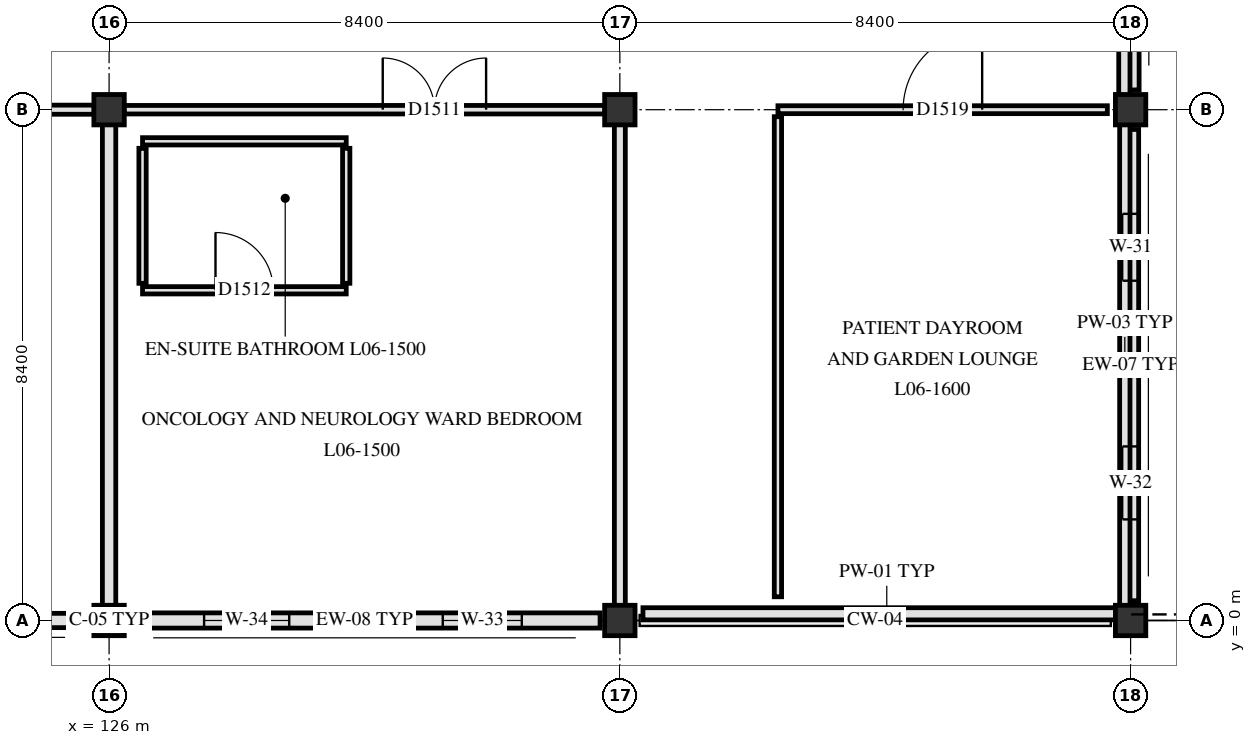
"""IFC4 building model, lengths in metres.
Left out: names, types, materials, properties, quantities, classifications, styles, units other than length and angle.
Written with IfcOpenShell. Run it as: python <this file> out.ifc"""

import sys

from ifc_helpers import new_model, si_unit, direction, frame, frame_2d, origin, origin_2d, place, context, subcontext, project, spatial, rectangle, extrude, element, fill, save


model = new_model("IFC4")
c1 = context("Model", 3, precision=1e-05, world=origin(), true_north=direction((0.0, 1.0)))
c2 = subcontext(c1, "Body", "Model", "MODEL_VIEW")
j1 = project(units=[si_unit("LENGTHUNIT", "METRE"), si_unit("PLANEANGLEUNIT", "RADIAN")], contexts=[c1])
p1 = place(None, origin())
s1 = spatial("IfcSite", under=j1, at=p1, CompositionType="ELEMENT")
p2 = place(p1, origin())
s2 = spatial("IfcBuilding", under=s1, at=p2, CompositionType="ELEMENT")
p3 = place(p2, frame((0.0, 0.0, 26.4)))
s3 = spatial("IfcBuildingStorey", under=s2, at=p3, CompositionType="ELEMENT", Elevation=26.4)
for number, where, z_axis, x_axis in (
    (1, (126.0, 0.0, 0.0), (0.0, 0.0, 1.0), (1.0, 0.0, 0.0)),
    (2, (126.0, 8.4, 0.0), (0.0, 0.0, 1.0), (1.0, 0.0, 0.0)),
    (3, (134.4, 0.0, 0.0), (0.0, 0.0, 1.0), (1.0, 0.0, 0.0)),
    (4, (134.4, 8.4, 0.0), (0.0, 0.0, 1.0), (1.0, 0.0, 0.0)),
    (5, (142.8, 0.0, 0.0), (0.0, 0.0, 1.0), (1.0, 0.0, 0.0)),
    (6, (142.8, 8.4, 0.0), (0.0, 0.0, 1.0), (1.0, 0.0, 0.0)),
):
    element("IfcColumn", number, at=place(p3, frame(where, z_axis=z_axis, x_axis=x_axis)), inside=s3, PredefinedType="COLUMN", context=c2, shape_type="SweptSolid", body=[
        extrude(rectangle(XDim=0.5, YDim=0.5, at=origin_2d()), origin(), (0.0, 0.0, 1.0), 3.9),
    ])
p4 = place(p3, frame((142.8, 16.475, 0.0), z_axis=(0.0, 0.0, 1.0), x_axis=(0.0, -1.0, 0.0)))
e7 = element("IfcWall", 7, at=p4, inside=s3, PredefinedType="SOLIDWALL", context=c2, shape_type="SweptSolid", body=[
    extrude(rectangle(XDim=7.75, YDim=0.28, at=frame_2d((3.875, 0.0))), origin(), (0.0, 0.0, 1.0), 3.34),
])
p5 = place(p4, frame((3.245, 0.0, 0.0)))
e8 = element("IfcOpeningElement", 8, at=p5, cuts=e7, PredefinedType="OPENING", context=c2, shape_type="SweptSolid", body=[
    extrude(rectangle(XDim=1.26, YDim=2.15, at=frame_2d((0.63, 1.075))), frame((0.0, 0.15, 0.0), z_axis=(0.0, -1.0, 0.0), x_axis=(1.0, 0.0, 0.0)), (0.0, 0.0, 1.0), 0.3),
])
p6 = place(p3, frame((142.8, 8.075, 0.0), z_axis=(0.0, 0.0, 1.0), x_axis=(0.0, -1.0, 0.0)))
e9 = element("IfcWall", 9, at=p6, inside=s3, PredefinedType="SOLIDWALL", context=c2, shape_type="SweptSolid", body=[
    extrude(rectangle(XDim=7.75, YDim=0.265, at=frame_2d((3.875, 0.0))), origin(), (0.0, 0.0, 1.0), 3.38),
])
p7 = place(p6, frame((1.387, 0.0, 0.85)))
e10 = element("IfcOpeningElement", 10, at=p7, cuts=e9, PredefinedType="OPENING", context=c2, shape_type="SweptSolid", body=[
    extrude(rectangle(XDim=1.1, YDim=1.66, at=frame_2d((0.55, 0.83))), frame((0.0, 0.142, 0.0), z_axis=(0.0, -1.0, 0.0), x_axis=(1.0, 0.0, 0.0)), (0.0, 0.0, 1.0), 0.285),
])
p8 = place(p6, frame((5.212, 0.0, 0.85)))
e11 = element("IfcOpeningElement", 11, at=p8, cuts=e9, PredefinedType="OPENING", context=c2, shape_type="SweptSolid", body=[
    extrude(rectangle(XDim=1.2, YDim=1.66, at=frame_2d((0.6, 0.83))), frame((0.0, 0.142, 0.0), z_axis=(0.0, -1.0, 0.0), x_axis=(1.0, 0.0, 0.0)), (0.0, 0.0, 1.0), 0.285),
])
p9 = place(p3, frame((134.075, 0.0, 0.0), z_axis=(0.0, 0.0, 1.0), x_axis=(-1.0, 0.0, 0.0)))
e12 = element("IfcWall", 12, at=p9, inside=s3, PredefinedType="SOLIDWALL", context=c2, shape_type="SweptSolid", body=[
    extrude(rectangle(XDim=7.75, YDim=0.25, at=frame_2d((3.875, 0.0))), origin(), (0.0, 0.0, 1.0), 3.36),
])
p10 = place(p9, frame((1.288, 0.0, 0.85)))
e13 = element("IfcOpeningElement", 13, at=p10, cuts=e12, PredefinedType="OPENING", context=c2, shape_type="SweptSolid", body=[
    extrude(rectangle(XDim=1.3, YDim=1.66, at=frame_2d((0.65, 0.83))), frame((0.0, 0.135, 0.0), z_axis=(0.0, -1.0, 0.0), x_axis=(1.0, 0.0, 0.0)), (0.0, 0.0, 1.0), 0.27),
])
p11 = place(p9, frame((5.113, 0.0, 0.85)))
e14 = element("IfcOpeningElement", 14, at=p11, cuts=e12, PredefinedType="OPENING", context=c2, shape_type="SweptSolid", body=[
    extrude(rectangle(XDim=1.4, YDim=1.66, at=frame_2d((0.7, 0.83))), frame((0.0, 0.135, 0.0), z_axis=(0.0, -1.0, 0.0), x_axis=(1.0, 0.0, 0.0)), (0.0, 0.0, 1.0), 0.27),
])
p12 = place(p3, frame((125.675, 0.0, 0.0), z_axis=(0.0, 0.0, 1.0), x_axis=(-1.0, 0.0, 0.0)))
e15 = element("IfcWall", 15, at=p12, inside=s3, PredefinedType="SOLIDWALL", context=c2, shape_type="SweptSolid", body=[
    extrude(rectangle(XDim=7.75, YDim=0.235, at=frame_2d((3.875, 0.0))), origin(), (0.0, 0.0, 1.0), 3.36),
])
p13 = place(p12, frame((1.188, 0.0, 0.85)))
e16 = element("IfcOpeningElement", 16, at=p13, cuts=e15, PredefinedType="OPENING", context=c2, shape_type="SweptSolid", body=[
    extrude(rectangle(XDim=1.5, YDim=1.66, at=frame_2d((0.75, 0.83))), frame((0.0, 0.127, 0.0), z_axis=(0.0, -1.0, 0.0), x_axis=(1.0, 0.0, 0.0)), (0.0, 0.0, 1.0), 0.255),
])
p14 = place(p12, frame((5.012, 0.0, 0.85)))
e17 = element("IfcOpeningElement", 17, at=p14, cuts=e15, PredefinedType="OPENING", context=c2, shape_type="SweptSolid", body=[
    extrude(rectangle(XDim=1.6, YDim=1.66, at=frame_2d((0.8, 0.83))), frame((0.0, 0.127, 0.0), z_axis=(0.0, -1.0, 0.0), x_axis=(1.0, 0.0, 0.0)), (0.0, 0.0, 1.0), 0.255),
])
p15 = place(p3, frame((142.698, 16.8, 3.88), z_axis=(0.0, 0.0, 1.0), x_axis=(0.0, -1.0, 0.0)))
e18 = element("IfcWall", 18, at=p15, inside=s3, PredefinedType="PARAPET", context=c2, shape_type="SweptSolid", body=[
    extrude(rectangle(XDim=8.4, YDim=0.185, at=frame_2d((4.2, 0.0))), origin(), (0.0, 0.0, 1.0), 1.17),
])
p16 = place(p3, frame((142.705, 8.4, 3.88), z_axis=(0.0, 0.0, 1.0), x_axis=(0.0, -1.0, 0.0)))
e19 = element("IfcWall", 19, at=p16, inside=s3, PredefinedType="PARAPET", context=c2, shape_type="SweptSolid", body=[
    extrude(rectangle(XDim=8.4, YDim=0.17, at=frame_2d((4.2, 0.0))), origin(), (0.0, 0.0, 1.0), 1.17),
])
p17 = place(p3, frame((142.8, 0.11, 3.88), z_axis=(0.0, 0.0, 1.0), x_axis=(-1.0, 0.0, 0.0)))
e20 = element("IfcWall", 20, at=p17, inside=s3, PredefinedType="PARAPET", context=c2, shape_type="SweptSolid", body=[
    extrude(rectangle(XDim=8.02, YDim=0.2, at=frame_2d((4.01, 0.0))), origin(), (0.0, 0.0, 1.0), 1.17),
])
p18 = place(p3, frame((126.55, 5.43, 0.0), z_axis=(0.0, 0.0, 1.0), x_axis=(1.0, 0.0, 0.0)))
e21 = element("IfcWall", 21, at=p18, inside=s3, PredefinedType="PARTITIONING", context=c2, shape_type="SweptSolid", body=[
    extrude(rectangle(XDim=3.35, YDim=0.12, at=frame_2d((1.675, 0.0))), origin(), (0.0, 0.0, 1.0), 3.61),
])
p19 = place(p18, frame((1.2, 0.0, 0.0)))
e22 = element("IfcOpeningElement", 22, at=p19, cuts=e21, PredefinedType="OPENING", context=c2, shape_type="SweptSolid", body=[
    extrude(rectangle(XDim=0.95, YDim=2.1, at=frame_2d((0.475, 1.05))), frame((0.0, 0.07, 0.0), z_axis=(0.0, -1.0, 0.0), x_axis=(1.0, 0.0, 0.0)), (0.0, 0.0, 1.0), 0.14),
])
p20 = place(p3, frame((126.55, 7.88, 0.0), z_axis=(0.0, 0.0, 1.0), x_axis=(1.0, 0.0, 0.0)))
e23 = element("IfcWall", 23, at=p20, inside=s3, PredefinedType="PARTITIONING", context=c2, shape_type="SweptSolid", body=[
    extrude(rectangle(XDim=3.35, YDim=0.12, at=frame_2d((1.675, 0.0))), origin(), (0.0, 0.0, 1.0), 3.61),
])
p21 = place(p3, frame((117.845, 8.4, 0.0), z_axis=(0.0, 0.0, 1.0), x_axis=(1.0, 0.0, 0.0)))
e24 = element("IfcWall", 24, at=p21, inside=s3, PredefinedType="PARTITIONING", context=c2, shape_type="SweptSolid", body=[
    extrude(rectangle(XDim=7.91, YDim=0.15, at=frame_2d((3.955, 0.0))), origin(), (0.0, 0.0, 1.0), 3.21),
])
p22 = place(p21, frame((4.315, 0.0, 0.0)))
e25 = element("IfcOpeningElement", 25, at=p22, cuts=e24, PredefinedType="OPENING", context=c2, shape_type="SweptSolid", body=[
    extrude(rectangle(XDim=1.58, YDim=2.22, at=frame_2d((0.79, 1.11))), frame((0.0, 0.085, 0.0), z_axis=(0.0, -1.0, 0.0), x_axis=(1.0, 0.0, 0.0)), (0.0, 0.0, 1.0), 0.17),
])
p23 = place(p3, frame((126.245, 8.4, 0.0), z_axis=(0.0, 0.0, 1.0), x_axis=(1.0, 0.0, 0.0)))
e26 = element("IfcWall", 26, at=p23, inside=s3, PredefinedType="PARTITIONING", context=c2, shape_type="SweptSolid", body=[
    extrude(rectangle(XDim=7.91, YDim=0.14, at=frame_2d((3.955, 0.0))), origin(), (0.0, 0.0, 1.0), 3.21),
])
p24 = place(p23, frame((4.256, 0.0, 0.0)))
e27 = element("IfcOpeningElement", 27, at=p24, cuts=e26, PredefinedType="OPENING", context=c2, shape_type="SweptSolid", body=[
    extrude(rectangle(XDim=1.7, YDim=2.25, at=frame_2d((0.85, 1.125))), frame((0.0, 0.08, 0.0), z_axis=(0.0, -1.0, 0.0), x_axis=(1.0, 0.0, 0.0)), (0.0, 0.0, 1.0), 0.16),
])
p25 = place(p3, frame((137.0, 8.4, 0.0), z_axis=(0.0, 0.0, 1.0), x_axis=(1.0, 0.0, 0.0)))
e28 = element("IfcWall", 28, at=p25, inside=s3, PredefinedType="PARTITIONING", context=c2, shape_type="SweptSolid", body=[
    extrude(rectangle(XDim=5.417, YDim=0.13, at=frame_2d((2.709, 0.0))), origin(), (0.0, 0.0, 1.0), 3.21),
])
p26 = place(p25, frame((2.059, 0.0, 0.0)))
e29 = element("IfcOpeningElement", 29, at=p26, cuts=e28, PredefinedType="OPENING", context=c2, shape_type="SweptSolid", body=[
    extrude(rectangle(XDim=1.3, YDim=2.2, at=frame_2d((0.65, 1.1))), frame((0.0, 0.075, 0.0), z_axis=(0.0, -1.0, 0.0), x_axis=(1.0, 0.0, 0.0)), (0.0, 0.0, 1.0), 0.15),
])
p27 = place(p3, frame((126.0, 0.245, 0.0), z_axis=(0.0, 0.0, 1.0), x_axis=(0.0, 1.0, 0.0)))
e30 = element("IfcWall", 30, at=p27, inside=s3, PredefinedType="PARTITIONING", context=c2, shape_type="SweptSolid", body=[
    extrude(rectangle(XDim=7.91, YDim=0.22, at=frame_2d((3.955, 0.0))), origin(), (0.0, 0.0, 1.0), 3.21),
])
for number, where, z_axis, x_axis in (
    (31, (126.55, 5.545, 0.0), (0.0, 0.0, 1.0), (0.0, 1.0, 0.0)),
    (32, (129.9, 5.545, 0.0), (0.0, 0.0, 1.0), (0.0, 1.0, 0.0)),
):
    element("IfcWall", number, at=place(p3, frame(where, z_axis=z_axis, x_axis=x_axis)), inside=s3, PredefinedType="PARTITIONING", context=c2, shape_type="SweptSolid", body=[
        extrude(rectangle(XDim=2.22, YDim=0.12, at=frame_2d((1.11, 0.0))), origin(), (0.0, 0.0, 1.0), 3.34),
    ])
p28 = place(p3, frame((134.4, 0.245, 0.0), z_axis=(0.0, 0.0, 1.0), x_axis=(0.0, 1.0, 0.0)))
e33 = element("IfcWall", 33, at=p28, inside=s3, PredefinedType="PARTITIONING", context=c2, shape_type="SweptSolid", body=[
    extrude(rectangle(XDim=7.91, YDim=0.18, at=frame_2d((3.955, 0.0))), origin(), (0.0, 0.0, 1.0), 3.21),
])
p29 = place(p3, frame((137.0, 0.39, 0.0), z_axis=(0.0, 0.0, 1.0), x_axis=(0.0, 1.0, 0.0)))
e34 = element("IfcWall", 34, at=p29, inside=s3, PredefinedType="PARTITIONING", context=c2, shape_type="SweptSolid", body=[
    extrude(rectangle(XDim=7.895, YDim=0.12, at=frame_2d((3.948, 0.0))), origin(), (0.0, 0.0, 1.0), 3.34),
])
p30 = place(p7, origin())
e35 = element("IfcWindow", 35, at=p30, inside=s3, PartitioningType="SINGLE_PANEL", PredefinedType="WINDOW", context=c2, shape_type="SweptSolid", body=[
    extrude(rectangle(XDim=1.1, YDim=1.66, at=frame_2d((0.55, 0.83))), frame((0.0, 0.03, 0.0), z_axis=(0.0, -1.0, 0.0), x_axis=(1.0, 0.0, 0.0)), (0.0, 0.0, 1.0), 0.06),
])
fill(e10, e35)
p31 = place(p8, origin())
e36 = element("IfcWindow", 36, at=p31, inside=s3, PartitioningType="SINGLE_PANEL", PredefinedType="WINDOW", context=c2, shape_type="SweptSolid", body=[
    extrude(rectangle(XDim=1.2, YDim=1.66, at=frame_2d((0.6, 0.83))), frame((0.0, 0.03, 0.0), z_axis=(0.0, -1.0, 0.0), x_axis=(1.0, 0.0, 0.0)), (0.0, 0.0, 1.0), 0.06),
])
fill(e11, e36)
p32 = place(p10, origin())
e37 = element("IfcWindow", 37, at=p32, inside=s3, PartitioningType="SINGLE_PANEL", PredefinedType="WINDOW", context=c2, shape_type="SweptSolid", body=[
    extrude(rectangle(XDim=1.3, YDim=1.66, at=frame_2d((0.65, 0.83))), frame((0.0, 0.03, 0.0), z_axis=(0.0, -1.0, 0.0), x_axis=(1.0, 0.0, 0.0)), (0.0, 0.0, 1.0), 0.06),
])
fill(e13, e37)
p33 = place(p11, origin())
e38 = element("IfcWindow", 38, at=p33, inside=s3, PartitioningType="SINGLE_PANEL", PredefinedType="WINDOW", context=c2, shape_type="SweptSolid", body=[
    extrude(rectangle(XDim=1.4, YDim=1.66, at=frame_2d((0.7, 0.83))), frame((0.0, 0.03, 0.0), z_axis=(0.0, -1.0, 0.0), x_axis=(1.0, 0.0, 0.0)), (0.0, 0.0, 1.0), 0.06),
])
fill(e14, e38)
p34 = place(p24, origin())
e39 = element("IfcDoor", 39, at=p34, inside=s3, OperationType="DOUBLE_SWING_RIGHT", PredefinedType="DOOR", context=c2, shape_type="SweptSolid", body=[
    extrude(rectangle(XDim=1.7, YDim=2.25, at=frame_2d((0.85, 1.125))), frame((0.0, 0.025, 0.0), z_axis=(0.0, -1.0, 0.0), x_axis=(1.0, 0.0, 0.0)), (0.0, 0.0, 1.0), 0.05),
])
fill(e27, e39)
p35 = place(p19, origin())
e40 = element("IfcDoor", 40, at=p35, inside=s3, OperationType="SINGLE_SWING_LEFT", PredefinedType="DOOR", context=c2, shape_type="SweptSolid", body=[
    extrude(rectangle(XDim=0.95, YDim=2.1, at=frame_2d((0.475, 1.05))), frame((0.0, 0.025, 0.0), z_axis=(0.0, -1.0, 0.0), x_axis=(1.0, 0.0, 0.0)), (0.0, 0.0, 1.0), 0.05),
])
fill(e22, e40)
p36 = place(p26, origin())
e41 = element("IfcDoor", 41, at=p36, inside=s3, OperationType="SINGLE_SWING_RIGHT", PredefinedType="DOOR", context=c2, shape_type="SweptSolid", body=[
    extrude(rectangle(XDim=1.3, YDim=2.2, at=frame_2d((0.65, 1.1))), frame((0.0, 0.025, 0.0), z_axis=(0.0, -1.0, 0.0), x_axis=(1.0, 0.0, 0.0)), (0.0, 0.0, 1.0), 0.05),
])
fill(e29, e41)
save(model, sys.argv[1])
